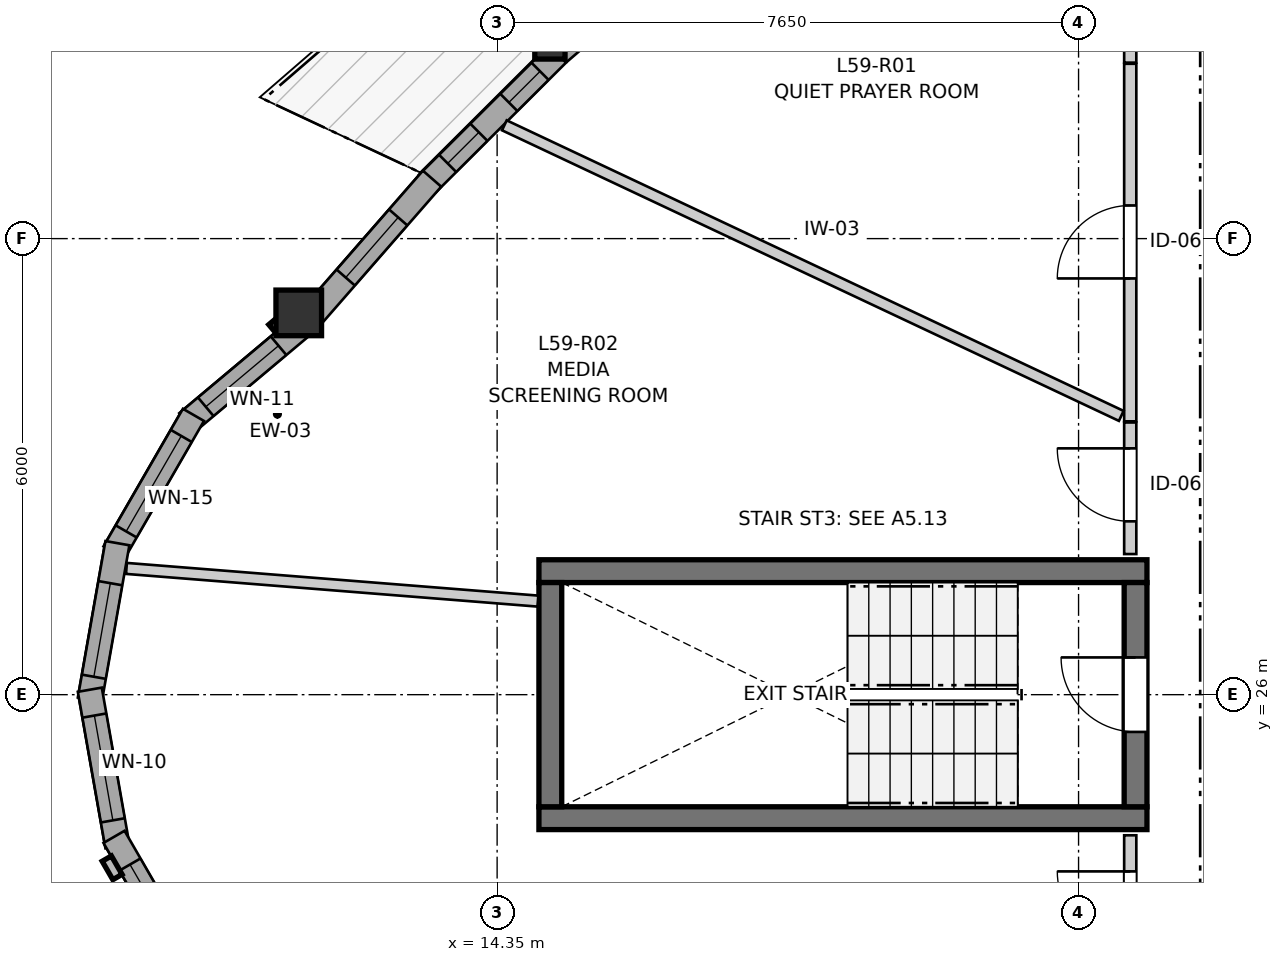
"""IFC4 building model, lengths in metres.
Left out: names, types, materials, properties, quantities, classifications, styles, units other than length and angle.
Written with IfcOpenShell. Run it as: python <this file> out.ifc"""

import sys

from ifc_helpers import new_model, si_unit, direction, frame, frame_2d, origin, origin_2d, place, context, subcontext, project, spatial, rectangle, i_section, extrude, source, transform, mapped, element, fill, save


model = new_model("IFC4")
c1 = context("Model", 3, precision=1e-05, world=origin(), true_north=direction((0.0, 1.0)))
c2 = subcontext(c1, "Body", "Model", "MODEL_VIEW")
j1 = project(units=[si_unit("LENGTHUNIT", "METRE"), si_unit("PLANEANGLEUNIT", "RADIAN")], contexts=[c1])
p1 = place(None, origin())
s1 = spatial("IfcSite", under=j1, at=p1, CompositionType="ELEMENT")
p2 = place(p1, origin())
s2 = spatial("IfcBuilding", under=s1, at=p2, CompositionType="ELEMENT")
p3 = place(p2, frame((0.0, 0.0, 198.8)))
s3 = spatial("IfcBuildingStorey", under=s2, at=p3, CompositionType="ELEMENT", Elevation=198.8)
for number, where, z_axis, x_axis in (
    (1, (14.9, 24.375, 0.0), (0.0, 0.0, 1.0), (1.0, 0.0, 0.0)),
    (2, (22.9, 27.625, 0.0), (0.0, 0.0, 1.0), (-1.0, 0.0, 0.0)),
):
    element("IfcWall", number, at=place(p3, frame(where, z_axis=z_axis, x_axis=x_axis)), inside=s3, PredefinedType="SHEAR", context=c2, shape_type="SweptSolid", body=[
        extrude(rectangle(XDim=8.0, YDim=0.3, at=frame_2d((4.0, 0.0))), origin(), (0.0, 0.0, 1.0), 2.96),
    ])
p4 = place(p3, frame((15.05, 27.475, 0.0), z_axis=(0.0, 0.0, 1.0), x_axis=(0.0, -1.0, 0.0)))
e3 = element("IfcWall", 3, at=p4, inside=s3, PredefinedType="SHEAR", context=c2, shape_type="SweptSolid", body=[
    extrude(rectangle(XDim=2.95, YDim=0.3, at=frame_2d((1.475, 0.0))), origin(), (0.0, 0.0, 1.0), 2.96),
])
p5 = place(p3, frame((22.75, 24.525, 0.0), z_axis=(0.0, 0.0, 1.0), x_axis=(0.0, 1.0, 0.0)))
e4 = element("IfcWall", 4, at=p5, inside=s3, PredefinedType="SHEAR", context=c2, shape_type="SweptSolid", body=[
    extrude(rectangle(XDim=2.95, YDim=0.3, at=frame_2d((1.475, 0.0))), origin(), (0.0, 0.0, 1.0), 2.96),
])
p6 = place(p5, frame((0.985, 0.0, 0.0)))
e5 = element("IfcOpeningElement", 5, at=p6, cuts=e4, PredefinedType="OPENING", context=c2, shape_type="SweptSolid", body=[
    extrude(rectangle(XDim=0.98, YDim=2.15, at=frame_2d((0.49, 1.075))), frame((0.0, 0.16, 0.0), z_axis=(0.0, -1.0, 0.0), x_axis=(1.0, 0.0, 0.0)), (0.0, 0.0, 1.0), 0.32),
])
m1 = source(origin(), c2, "Body", "SweptSolid", [
    extrude(rectangle(XDim=0.6, YDim=0.6, at=origin_2d()), origin(), (0.0, 0.0, 1.0), 2.96),
])
p7 = place(p3, frame((11.74, 31.023, 0.0), z_axis=(0.0, 0.0, 1.0), x_axis=(1.0, 0.0, 0.0)))
e6 = element("IfcColumn", 6, at=p7, inside=s3, PredefinedType="COLUMN", context=c2, shape_type="MappedRepresentation", body=[
    mapped(m1, transform((0.0, 0.0, 0.0), x_axis=(1.0, 0.0, 0.0), y_axis=(0.0, 1.0, 0.0), z_axis=(0.0, 0.0, 1.0), scale=1.0)),
])
m2 = source(origin(), c2, "Body", "SweptSolid", [
    extrude(i_section(OverallWidth=0.398, OverallDepth=0.387, WebThickness=0.019, FlangeThickness=0.03, FilletRadius=0.015, at=origin_2d()), origin(), (0.0, 0.0, 1.0), 2.96),
])
p8 = place(p3, frame((15.044, 34.555, 0.0), z_axis=(0.0, 0.0, 1.0), x_axis=(1.0, 0.0, 0.0)))
e7 = element("IfcColumn", 7, at=p8, inside=s3, PredefinedType="PILASTER", context=c2, shape_type="MappedRepresentation", body=[
    mapped(m2, transform((0.0, 0.0, 0.0), x_axis=(1.0, 0.0, 0.0), y_axis=(0.0, 1.0, 0.0), z_axis=(0.0, 0.0, 1.0), scale=1.0)),
])
p9 = place(p3, frame((11.774, 30.843, 0.0), z_axis=(0.0, 0.0, 1.0), x_axis=(-0.766116451135, -0.642701784112, 0.0)))
e8 = element("IfcWall", 8, at=p9, inside=s3, PredefinedType="SOLIDWALL", context=c2, shape_type="SweptSolid", body=[
    extrude(rectangle(XDim=1.962, YDim=0.32, at=frame_2d((0.981, 0.0))), origin(), (0.0, 0.0, 1.0), 2.58),
])
p10 = place(p9, frame((0.391, 0.0, 0.82)))
e9 = element("IfcOpeningElement", 9, at=p10, cuts=e8, PredefinedType="OPENING", context=c2, shape_type="SweptSolid", body=[
    extrude(rectangle(XDim=1.25, YDim=1.35, at=frame_2d((0.625, 0.675))), frame((0.0, 0.17, 0.0), z_axis=(0.0, -1.0, 0.0), x_axis=(1.0, 0.0, 0.0)), (0.0, 0.0, 1.0), 0.34),
])
p11 = place(p3, frame((10.354, 29.681, 0.0), z_axis=(0.0, 0.0, 1.0), x_axis=(-0.499995423472, -0.866028046028, 0.0)))
e10 = element("IfcWall", 10, at=p11, inside=s3, PredefinedType="SOLIDWALL", context=c2, shape_type="SweptSolid", body=[
    extrude(rectangle(XDim=2.09, YDim=0.32, at=frame_2d((1.045, 0.0))), origin(), (0.0, 0.0, 1.0), 2.58),
])
p12 = place(p11, frame((0.32, 0.0, 0.82)))
e11 = element("IfcOpeningElement", 11, at=p12, cuts=e10, PredefinedType="OPENING", context=c2, shape_type="SweptSolid", body=[
    extrude(rectangle(XDim=1.45, YDim=1.25, at=frame_2d((0.725, 0.625))), frame((0.0, 0.17, 0.0), z_axis=(0.0, -1.0, 0.0), x_axis=(1.0, 0.0, 0.0)), (0.0, 0.0, 1.0), 0.34),
])
p13 = place(p3, frame((9.354, 27.993, 0.0), z_axis=(0.0, 0.0, 1.0), x_axis=(-0.173672066494, -0.984803540469, 0.0)))
e12 = element("IfcWall", 12, at=p13, inside=s3, PredefinedType="SOLIDWALL", context=c2, shape_type="SweptSolid", body=[
    extrude(rectangle(XDim=2.09, YDim=0.32, at=frame_2d((1.045, 0.0))), origin(), (0.0, 0.0, 1.0), 2.58),
])
p14 = place(p13, frame((0.535, 0.0, 0.82)))
e13 = element("IfcOpeningElement", 13, at=p14, cuts=e12, PredefinedType="OPENING", context=c2, shape_type="SweptSolid", body=[
    extrude(rectangle(XDim=1.25, YDim=1.35, at=frame_2d((0.625, 0.675))), frame((0.0, 0.17, 0.0), z_axis=(0.0, -1.0, 0.0), x_axis=(1.0, 0.0, 0.0)), (0.0, 0.0, 1.0), 0.34),
])
p15 = place(p3, frame((8.991, 26.065, 0.0), z_axis=(0.0, 0.0, 1.0), x_axis=(0.173672066494, -0.984803540469, 0.0)))
e14 = element("IfcWall", 14, at=p15, inside=s3, PredefinedType="SOLIDWALL", context=c2, shape_type="SweptSolid", body=[
    extrude(rectangle(XDim=2.09, YDim=0.32, at=frame_2d((1.045, 0.0))), origin(), (0.0, 0.0, 1.0), 2.58),
])
p16 = place(p15, frame((0.345, 0.0, 0.82)))
e15 = element("IfcOpeningElement", 15, at=p16, cuts=e14, PredefinedType="OPENING", context=c2, shape_type="SweptSolid", body=[
    extrude(rectangle(XDim=1.4, YDim=1.35, at=frame_2d((0.7, 0.675))), frame((0.0, 0.17, 0.0), z_axis=(0.0, -1.0, 0.0), x_axis=(1.0, 0.0, 0.0)), (0.0, 0.0, 1.0), 0.34),
])
p17 = place(p3, frame((9.309, 24.129, 0.0), z_axis=(0.0, 0.0, 1.0), x_axis=(0.499995423472, -0.866028046028, 0.0)))
e16 = element("IfcWall", 16, at=p17, inside=s3, PredefinedType="SOLIDWALL", context=c2, shape_type="SweptSolid", body=[
    extrude(rectangle(XDim=2.09, YDim=0.32, at=frame_2d((1.045, 0.0))), origin(), (0.0, 0.0, 1.0), 2.58),
])
p18 = place(p17, frame((0.42, 0.0, 0.82)))
e17 = element("IfcOpeningElement", 17, at=p18, cuts=e16, PredefinedType="OPENING", context=c2, shape_type="SweptSolid", body=[
    extrude(rectangle(XDim=1.25, YDim=1.35, at=frame_2d((0.625, 0.675))), frame((0.0, 0.17, 0.0), z_axis=(0.0, -1.0, 0.0), x_axis=(1.0, 0.0, 0.0)), (0.0, 0.0, 1.0), 0.34),
])
p19 = place(p3, frame((16.962, 35.997, 0.0), z_axis=(0.0, 0.0, 1.0), x_axis=(-0.757474860475, -0.652864331808, 0.0)))
e18 = element("IfcWall", 18, at=p19, inside=s3, PredefinedType="SOLIDWALL", context=c2, shape_type="SweptSolid", body=[
    extrude(rectangle(XDim=2.374, YDim=0.32, at=frame_2d((1.187, 0.0))), origin(), (0.0, 0.0, 1.0), 2.58),
])
p20 = place(p19, frame((0.522, 0.0, 0.82)))
e19 = element("IfcOpeningElement", 19, at=p20, cuts=e18, PredefinedType="OPENING", context=c2, shape_type="SweptSolid", body=[
    extrude(rectangle(XDim=1.35, YDim=1.45, at=frame_2d((0.675, 0.725))), frame((0.0, 0.17, 0.0), z_axis=(0.0, -1.0, 0.0), x_axis=(1.0, 0.0, 0.0)), (0.0, 0.0, 1.0), 0.34),
])
p21 = place(p3, frame((15.143, 34.428, 0.0), z_axis=(0.0, 0.0, 1.0), x_axis=(-0.708370597245, -0.705840702255, 0.0)))
e20 = element("IfcWall", 20, at=p21, inside=s3, PredefinedType="SOLIDWALL", context=c2, shape_type="SweptSolid", body=[
    extrude(rectangle(XDim=2.413, YDim=0.32, at=frame_2d((1.206, 0.0))), origin(), (0.0, 0.0, 1.0), 2.58),
])
p22 = place(p21, frame((0.322, 0.0, 0.82)))
e21 = element("IfcOpeningElement", 21, at=p22, cuts=e20, PredefinedType="OPENING", context=c2, shape_type="SweptSolid", body=[
    extrude(rectangle(XDim=0.58, YDim=1.35, at=frame_2d((0.29, 0.675))), frame((0.0, 0.17, 0.0), z_axis=(0.0, -1.0, 0.0), x_axis=(1.0, 0.0, 0.0)), (0.0, 0.0, 1.0), 0.34),
])
p23 = place(p21, frame((1.458, 0.0, 0.82)))
e22 = element("IfcOpeningElement", 22, at=p23, cuts=e20, PredefinedType="OPENING", context=c2, shape_type="SweptSolid", body=[
    extrude(rectangle(XDim=0.58, YDim=1.35, at=frame_2d((0.29, 0.675))), frame((0.0, 0.17, 0.0), z_axis=(0.0, -1.0, 0.0), x_axis=(1.0, 0.0, 0.0)), (0.0, 0.0, 1.0), 0.34),
])
p24 = place(p3, frame((13.494, 32.789, 0.0), z_axis=(0.0, 0.0, 1.0), x_axis=(-0.65765213646, -0.753321755566, 0.0)))
e23 = element("IfcWall", 23, at=p24, inside=s3, PredefinedType="SOLIDWALL", context=c2, shape_type="SweptSolid", body=[
    extrude(rectangle(XDim=2.394, YDim=0.32, at=frame_2d((1.197, 0.0))), origin(), (0.0, 0.0, 1.0), 2.58),
])
p25 = place(p24, frame((0.677, 0.0, 0.82)))
e24 = element("IfcOpeningElement", 24, at=p25, cuts=e23, PredefinedType="OPENING", context=c2, shape_type="SweptSolid", body=[
    extrude(rectangle(XDim=1.05, YDim=1.45, at=frame_2d((0.525, 0.725))), frame((0.0, 0.17, 0.0), z_axis=(0.0, -1.0, 0.0), x_axis=(1.0, 0.0, 0.0)), (0.0, 0.0, 1.0), 0.34),
])
p26 = place(p3, frame((22.68, 29.596, 0.0), z_axis=(0.0, 0.0, 1.0), x_axis=(0.0, 1.0, 0.0)))
e25 = element("IfcWall", 25, at=p26, inside=s3, PredefinedType="PARTITIONING", context=c2, shape_type="SweptSolid", body=[
    extrude(rectangle(XDim=4.704, YDim=0.16, at=frame_2d((2.352, 0.0))), origin(), (0.0, 0.0, 1.0), 2.96),
])
p27 = place(p26, frame((1.88, 0.0, 0.0)))
e26 = element("IfcOpeningElement", 26, at=p27, cuts=e25, PredefinedType="OPENING", context=c2, shape_type="SweptSolid", body=[
    extrude(rectangle(XDim=0.96, YDim=2.1, at=frame_2d((0.48, 1.05))), frame((0.0, 0.09, 0.0), z_axis=(0.0, -1.0, 0.0), x_axis=(1.0, 0.0, 0.0)), (0.0, 0.0, 1.0), 0.18),
])
p28 = place(p3, frame((22.68, 22.196, 0.0), z_axis=(0.0, 0.0, 1.0), x_axis=(0.0, 1.0, 0.0)))
e27 = element("IfcWall", 27, at=p28, inside=s3, PredefinedType="PARTITIONING", context=c2, shape_type="SweptSolid", body=[
    extrude(rectangle(XDim=1.954, YDim=0.16, at=frame_2d((0.977, 0.0))), origin(), (0.0, 0.0, 1.0), 2.96),
])
p29 = place(p28, frame((0.519, 0.0, 0.0)))
e28 = element("IfcOpeningElement", 28, at=p29, cuts=e27, PredefinedType="OPENING", context=c2, shape_type="SweptSolid", body=[
    extrude(rectangle(XDim=0.96, YDim=2.1, at=frame_2d((0.48, 1.05))), frame((0.0, 0.09, 0.0), z_axis=(0.0, -1.0, 0.0), x_axis=(1.0, 0.0, 0.0)), (0.0, 0.0, 1.0), 0.18),
])
p30 = place(p3, frame((22.68, 27.85, 0.0), z_axis=(0.0, 0.0, 1.0), x_axis=(0.0, 1.0, 0.0)))
e29 = element("IfcWall", 29, at=p30, inside=s3, PredefinedType="PARTITIONING", context=c2, shape_type="SweptSolid", body=[
    extrude(rectangle(XDim=1.731, YDim=0.16, at=frame_2d((0.865, 0.0))), origin(), (0.0, 0.0, 1.0), 2.96),
])
p31 = place(p30, frame((0.43, 0.0, 0.0)))
e30 = element("IfcOpeningElement", 30, at=p31, cuts=e29, PredefinedType="OPENING", context=c2, shape_type="SweptSolid", body=[
    extrude(rectangle(XDim=0.96, YDim=2.1, at=frame_2d((0.48, 1.05))), frame((0.0, 0.09, 0.0), z_axis=(0.0, -1.0, 0.0), x_axis=(1.0, 0.0, 0.0)), (0.0, 0.0, 1.0), 0.18),
])
p32 = place(p3, frame((14.445, 33.49, 0.0), z_axis=(0.0, 0.0, 1.0), x_axis=(0.904673727325, -0.426104971912, 0.0)))
e31 = element("IfcWall", 31, at=p32, inside=s3, PredefinedType="PARTITIONING", context=c2, shape_type="SweptSolid", body=[
    extrude(rectangle(XDim=8.972, YDim=0.145, at=frame_2d((4.486, 0.0))), origin(), (0.0, 0.0, 1.0), 2.96),
])
p33 = place(p3, frame((9.473, 27.661, 0.0), z_axis=(0.0, 0.0, 1.0), x_axis=(0.996864548282, -0.079126938392, 0.0)))
e32 = element("IfcWall", 32, at=p33, inside=s3, PredefinedType="PARTITIONING", context=c2, shape_type="SweptSolid", body=[
    extrude(rectangle(XDim=5.43, YDim=0.145, at=frame_2d((2.715, 0.0))), origin(), (0.0, 0.0, 1.0), 2.96),
])
p34 = place(p3, frame((22.68, 34.315, 0.0), z_axis=(0.0, 0.0, 1.0), x_axis=(0.0, 1.0, 0.0)))
e33 = element("IfcWall", 33, at=p34, inside=s3, PredefinedType="PARTITIONING", context=c2, shape_type="SweptSolid", body=[
    extrude(rectangle(XDim=1.605, YDim=0.16, at=frame_2d((0.802, 0.0))), origin(), (0.0, 0.0, 1.0), 2.96),
])
m3 = source(origin(), c2, "Body", "SweptSolid", [
    extrude(rectangle(XDim=1.25, YDim=1.35, at=frame_2d((0.625, 0.675))), frame((0.0, 0.03, 0.0), z_axis=(0.0, -1.0, 0.0), x_axis=(1.0, 0.0, 0.0)), (0.0, 0.0, 1.0), 0.06),
])
p35 = place(p10, origin())
e34 = element("IfcWindow", 34, at=p35, inside=s3, PartitioningType="SINGLE_PANEL", PredefinedType="WINDOW", context=c2, shape_type="MappedRepresentation", body=[
    mapped(m3, transform((0.0, 0.0, 0.0), x_axis=(1.0, 0.0, 0.0), y_axis=(0.0, 1.0, 0.0), z_axis=(0.0, 0.0, 1.0), scale=1.0)),
])
fill(e9, e34)
m4 = source(origin(), c2, "Body", "SweptSolid", [
    extrude(rectangle(XDim=1.45, YDim=1.25, at=frame_2d((0.725, 0.625))), frame((0.0, 0.03, 0.0), z_axis=(0.0, -1.0, 0.0), x_axis=(1.0, 0.0, 0.0)), (0.0, 0.0, 1.0), 0.06),
])
p36 = place(p12, origin())
e35 = element("IfcWindow", 35, at=p36, inside=s3, PartitioningType="SINGLE_PANEL", PredefinedType="WINDOW", context=c2, shape_type="MappedRepresentation", body=[
    mapped(m4, transform((0.0, 0.0, 0.0), x_axis=(1.0, 0.0, 0.0), y_axis=(0.0, 1.0, 0.0), z_axis=(0.0, 0.0, 1.0), scale=1.0)),
])
fill(e11, e35)
p37 = place(p14, origin())
e36 = element("IfcWindow", 36, at=p37, inside=s3, PartitioningType="SINGLE_PANEL", PredefinedType="WINDOW", context=c2, shape_type="MappedRepresentation", body=[
    mapped(m3, transform((0.0, 0.0, 0.0), x_axis=(1.0, 0.0, 0.0), y_axis=(0.0, 1.0, 0.0), z_axis=(0.0, 0.0, 1.0), scale=1.0)),
])
fill(e13, e36)
m5 = source(origin(), c2, "Body", "SweptSolid", [
    extrude(rectangle(XDim=1.4, YDim=1.35, at=frame_2d((0.7, 0.675))), frame((0.0, 0.03, 0.0), z_axis=(0.0, -1.0, 0.0), x_axis=(1.0, 0.0, 0.0)), (0.0, 0.0, 1.0), 0.06),
])
p38 = place(p16, origin())
e37 = element("IfcWindow", 37, at=p38, inside=s3, PartitioningType="SINGLE_PANEL", PredefinedType="WINDOW", context=c2, shape_type="MappedRepresentation", body=[
    mapped(m5, transform((0.0, 0.0, 0.0), x_axis=(1.0, 0.0, 0.0), y_axis=(0.0, 1.0, 0.0), z_axis=(0.0, 0.0, 1.0), scale=1.0)),
])
fill(e15, e37)
p39 = place(p18, origin())
e38 = element("IfcWindow", 38, at=p39, inside=s3, PartitioningType="SINGLE_PANEL", PredefinedType="WINDOW", context=c2, shape_type="MappedRepresentation", body=[
    mapped(m3, transform((0.0, 0.0, 0.0), x_axis=(1.0, 0.0, 0.0), y_axis=(0.0, 1.0, 0.0), z_axis=(0.0, 0.0, 1.0), scale=1.0)),
])
fill(e17, e38)
m6 = source(origin(), c2, "Body", "SweptSolid", [
    extrude(rectangle(XDim=0.58, YDim=1.35, at=frame_2d((0.29, 0.675))), frame((0.0, 0.03, 0.0), z_axis=(0.0, -1.0, 0.0), x_axis=(1.0, 0.0, 0.0)), (0.0, 0.0, 1.0), 0.06),
])
p40 = place(p22, origin())
e39 = element("IfcWindow", 39, at=p40, inside=s3, PartitioningType="SINGLE_PANEL", PredefinedType="WINDOW", context=c2, shape_type="MappedRepresentation", body=[
    mapped(m6, transform((0.0, 0.0, 0.0), x_axis=(1.0, 0.0, 0.0), y_axis=(0.0, 1.0, 0.0), z_axis=(0.0, 0.0, 1.0), scale=1.0)),
])
fill(e21, e39)
p41 = place(p23, origin())
e40 = element("IfcWindow", 40, at=p41, inside=s3, PartitioningType="SINGLE_PANEL", PredefinedType="WINDOW", context=c2, shape_type="MappedRepresentation", body=[
    mapped(m6, transform((0.0, 0.0, 0.0), x_axis=(1.0, 0.0, 0.0), y_axis=(0.0, 1.0, 0.0), z_axis=(0.0, 0.0, 1.0), scale=1.0)),
])
fill(e22, e40)
m7 = source(origin(), c2, "Body", "SweptSolid", [
    extrude(rectangle(XDim=1.05, YDim=1.45, at=frame_2d((0.525, 0.725))), frame((0.0, 0.03, 0.0), z_axis=(0.0, -1.0, 0.0), x_axis=(1.0, 0.0, 0.0)), (0.0, 0.0, 1.0), 0.06),
])
p42 = place(p25, origin())
e41 = element("IfcWindow", 41, at=p42, inside=s3, PartitioningType="SINGLE_PANEL", PredefinedType="WINDOW", context=c2, shape_type="MappedRepresentation", body=[
    mapped(m7, transform((0.0, 0.0, 0.0), x_axis=(1.0, 0.0, 0.0), y_axis=(0.0, 1.0, 0.0), z_axis=(0.0, 0.0, 1.0), scale=1.0)),
])
fill(e24, e41)
m8 = source(origin(), c2, "Body", "SweptSolid", [
    extrude(rectangle(XDim=0.98, YDim=2.15, at=frame_2d((0.49, 1.075))), frame((0.0, 0.025, 0.0), z_axis=(0.0, -1.0, 0.0), x_axis=(1.0, 0.0, 0.0)), (0.0, 0.0, 1.0), 0.05),
])
p43 = place(p6, origin())
e42 = element("IfcDoor", 42, at=p43, inside=s3, OperationType="SINGLE_SWING_RIGHT", PredefinedType="DOOR", context=c2, shape_type="MappedRepresentation", body=[
    mapped(m8, transform((0.0, 0.0, 0.0), x_axis=(1.0, 0.0, 0.0), y_axis=(0.0, 1.0, 0.0), z_axis=(0.0, 0.0, 1.0), scale=1.0)),
])
fill(e5, e42)
m9 = source(origin(), c2, "Body", "SweptSolid", [
    extrude(rectangle(XDim=0.96, YDim=2.1, at=frame_2d((0.48, 1.05))), frame((0.0, 0.025, 0.0), z_axis=(0.0, -1.0, 0.0), x_axis=(1.0, 0.0, 0.0)), (0.0, 0.0, 1.0), 0.05),
])
p44 = place(p27, origin())
e43 = element("IfcDoor", 43, at=p44, inside=s3, OperationType="SINGLE_SWING_LEFT", PredefinedType="DOOR", context=c2, shape_type="MappedRepresentation", body=[
    mapped(m9, transform((0.0, 0.0, 0.0), x_axis=(1.0, 0.0, 0.0), y_axis=(0.0, 1.0, 0.0), z_axis=(0.0, 0.0, 1.0), scale=1.0)),
])
fill(e26, e43)
p45 = place(p29, origin())
e44 = element("IfcDoor", 44, at=p45, inside=s3, OperationType="SINGLE_SWING_RIGHT", PredefinedType="DOOR", context=c2, shape_type="MappedRepresentation", body=[
    mapped(m9, transform((0.0, 0.0, 0.0), x_axis=(1.0, 0.0, 0.0), y_axis=(0.0, 1.0, 0.0), z_axis=(0.0, 0.0, 1.0), scale=1.0)),
])
fill(e28, e44)
p46 = place(p31, origin())
e45 = element("IfcDoor", 45, at=p46, inside=s3, OperationType="SINGLE_SWING_RIGHT", PredefinedType="DOOR", context=c2, shape_type="MappedRepresentation", body=[
    mapped(m9, transform((0.0, 0.0, 0.0), x_axis=(1.0, 0.0, 0.0), y_axis=(0.0, 1.0, 0.0), z_axis=(0.0, 0.0, 1.0), scale=1.0)),
])
fill(e30, e45)
save(model, sys.argv[1])
